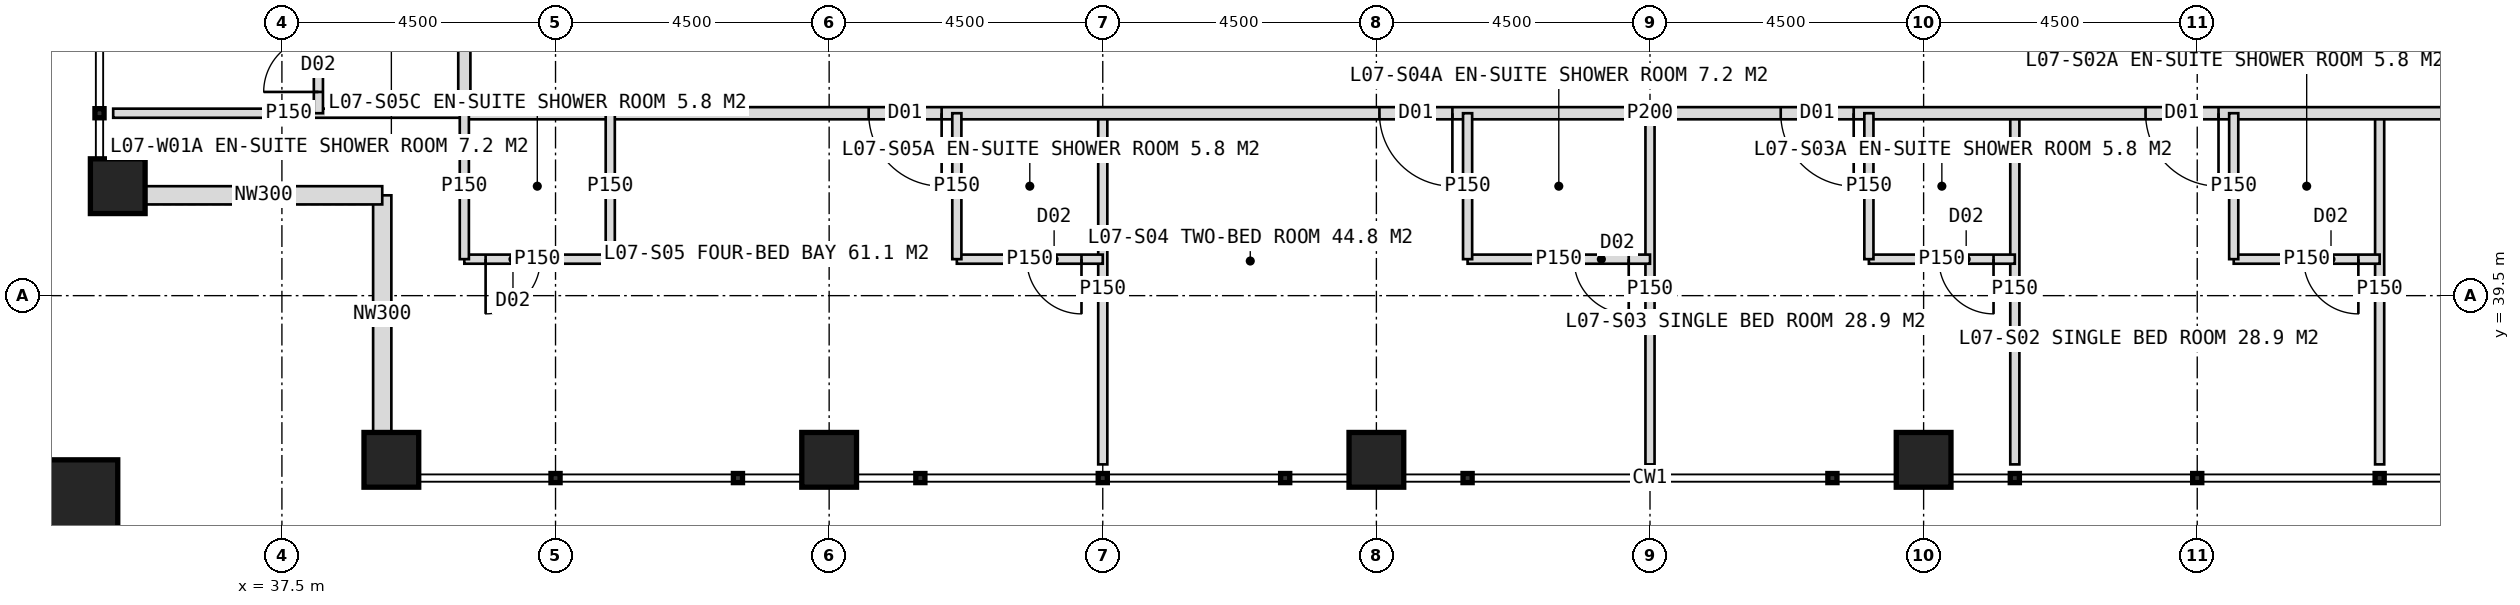
"""IFC4 building model, lengths in metres.
Left out: names, types, materials, properties, quantities, classifications, styles, units other than length and angle.
Written with IfcOpenShell. Run it as: python <this file> out.ifc"""

import sys

from ifc_helpers import new_model, si_unit, direction, frame, frame_2d, origin, origin_2d, place, context, subcontext, project, spatial, rectangle, hollow_rectangle, extrude, element, fill, save


model = new_model("IFC4")
c1 = context("Model", 3, precision=1e-05, world=origin(), true_north=direction((0.0, 1.0)))
c2 = subcontext(c1, "Body", "Model", "MODEL_VIEW")
j1 = project(units=[si_unit("LENGTHUNIT", "METRE"), si_unit("PLANEANGLEUNIT", "RADIAN")], contexts=[c1])
p1 = place(None, origin())
s1 = spatial("IfcSite", under=j1, at=p1, CompositionType="ELEMENT")
p2 = place(p1, origin())
s2 = spatial("IfcBuilding", under=s1, at=p2, CompositionType="ELEMENT")
p3 = place(p2, frame((0.0, 0.0, 35.0)))
s3 = spatial("IfcBuildingStorey", under=s2, at=p3, CompositionType="ELEMENT", Elevation=35.0)
for number, where, z_axis, x_axis in (
    (1, (39.3, 36.8, 0.0), (0.0, 0.0, 1.0), (1.0, 0.0, 0.0)),
    (2, (34.8, 41.3, 0.0), (0.0, 0.0, 1.0), (1.0, 0.0, 0.0)),
    (3, (46.5, 36.8, 0.0), (0.0, 0.0, 1.0), (1.0, 0.0, 0.0)),
    (4, (55.5, 36.8, 0.0), (0.0, 0.0, 1.0), (1.0, 0.0, 0.0)),
    (5, (64.5, 36.8, 0.0), (0.0, 0.0, 1.0), (1.0, 0.0, 0.0)),
):
    element("IfcColumn", number, at=place(p3, frame(where, z_axis=z_axis, x_axis=x_axis)), inside=s3, PredefinedType="COLUMN", context=c2, shape_type="SweptSolid", body=[
        extrude(hollow_rectangle(XDim=0.9, YDim=0.9, WallThickness=0.08, at=origin_2d()), origin(), (0.0, 0.0, 1.0), 4.0),
    ])
p4 = place(p3, frame((33.9, 35.9, 0.0), z_axis=(0.0, 0.0, 1.0), x_axis=(1.0, 0.0, 0.0)))
e6 = element("IfcColumn", 6, at=p4, inside=s3, PredefinedType="COLUMN", context=c2, shape_type="SweptSolid", body=[
    extrude(hollow_rectangle(XDim=1.8, YDim=1.8, WallThickness=0.1, at=origin_2d()), origin(), (0.0, 0.0, 1.0), 4.0),
])
for number, where, z_axis, x_axis in (
    (7, (39.15, 37.25, 0.0), (0.0, 0.0, 1.0), (0.0, 1.0, 0.0)),
    (8, (39.15, 41.15, 0.0), (0.0, 0.0, 1.0), (-1.0, 0.0, 0.0)),
):
    element("IfcWall", number, at=place(p3, frame(where, z_axis=z_axis, x_axis=x_axis)), inside=s3, PredefinedType="ELEMENTEDWALL", context=c2, shape_type="SweptSolid", body=[
        extrude(rectangle(XDim=3.9, YDim=0.3, at=frame_2d((1.95, 0.0))), origin(), (0.0, 0.0, 1.0), 2.95),
    ])
p5 = place(p3, frame((40.5, 42.5, 0.0), z_axis=(0.0, 0.0, 1.0), x_axis=(0.0, 1.0, 0.0)))
e9 = element("IfcWall", 9, at=p5, inside=s3, PredefinedType="PARTITIONING", context=c2, shape_type="SweptSolid", body=[
    extrude(rectangle(XDim=39.0, YDim=0.2, at=frame_2d((19.5, 0.0))), origin(), (0.0, 0.0, 1.0), 3.75),
])
p6 = place(p5, frame((3.25, 0.0, 0.0)))
e10 = element("IfcOpeningElement", 10, at=p6, cuts=e9, PredefinedType="OPENING", context=c2, shape_type="SweptSolid", body=[
    extrude(rectangle(XDim=1.2, YDim=2.2, at=frame_2d((0.6, 1.1))), frame((0.0, 0.11, 0.0), z_axis=(0.0, -1.0, 0.0), x_axis=(1.0, 0.0, 0.0)), (0.0, 0.0, 1.0), 0.22),
])
p7 = place(p5, frame((10.15, 0.0, 0.0)))
e11 = element("IfcOpeningElement", 11, at=p7, cuts=e9, PredefinedType="OPENING", context=c2, shape_type="SweptSolid", body=[
    extrude(rectangle(XDim=1.2, YDim=2.2, at=frame_2d((0.6, 1.1))), frame((0.0, 0.11, 0.0), z_axis=(0.0, -1.0, 0.0), x_axis=(1.0, 0.0, 0.0)), (0.0, 0.0, 1.0), 0.22),
])
p8 = place(p5, frame((16.15, 0.0, 0.0)))
e12 = element("IfcOpeningElement", 12, at=p8, cuts=e9, PredefinedType="OPENING", context=c2, shape_type="SweptSolid", body=[
    extrude(rectangle(XDim=1.2, YDim=2.2, at=frame_2d((0.6, 1.1))), frame((0.0, 0.11, 0.0), z_axis=(0.0, -1.0, 0.0), x_axis=(1.0, 0.0, 0.0)), (0.0, 0.0, 1.0), 0.22),
])
p9 = place(p5, frame((22.75, 0.0, 0.0)))
e13 = element("IfcOpeningElement", 13, at=p9, cuts=e9, PredefinedType="OPENING", context=c2, shape_type="SweptSolid", body=[
    extrude(rectangle(XDim=1.2, YDim=2.2, at=frame_2d((0.6, 1.1))), frame((0.0, 0.11, 0.0), z_axis=(0.0, -1.0, 0.0), x_axis=(1.0, 0.0, 0.0)), (0.0, 0.0, 1.0), 0.22),
])
p10 = place(p5, frame((31.15, 0.0, 0.0)))
e14 = element("IfcOpeningElement", 14, at=p10, cuts=e9, PredefinedType="OPENING", context=c2, shape_type="SweptSolid", body=[
    extrude(rectangle(XDim=1.2, YDim=2.2, at=frame_2d((0.6, 1.1))), frame((0.0, 0.11, 0.0), z_axis=(0.0, -1.0, 0.0), x_axis=(1.0, 0.0, 0.0)), (0.0, 0.0, 1.0), 0.22),
])
p11 = place(p3, frame((40.5, 42.5, 0.0), z_axis=(0.0, 0.0, 1.0), x_axis=(-1.0, 0.0, 0.0)))
e15 = element("IfcWall", 15, at=p11, inside=s3, PredefinedType="PARTITIONING", context=c2, shape_type="SweptSolid", body=[
    extrude(rectangle(XDim=5.775, YDim=0.15, at=frame_2d((2.887, 0.0))), origin(), (0.0, 0.0, 1.0), 3.75),
])
p12 = place(p3, frame((38.1, 42.5, 0.0), z_axis=(0.0, 0.0, 1.0), x_axis=(0.0, 1.0, 0.0)))
e16 = element("IfcWall", 16, at=p12, inside=s3, PredefinedType="PARTITIONING", context=c2, shape_type="SweptSolid", body=[
    extrude(rectangle(XDim=3.0, YDim=0.15, at=frame_2d((1.5, 0.0))), origin(), (0.0, 0.0, 1.0), 3.75),
])
p13 = place(p12, frame((0.35, 0.0, 0.0)))
e17 = element("IfcOpeningElement", 17, at=p13, cuts=e16, PredefinedType="OPENING", context=c2, shape_type="SweptSolid", body=[
    extrude(rectangle(XDim=0.9, YDim=2.1, at=frame_2d((0.45, 1.05))), frame((0.0, 0.085, 0.0), z_axis=(0.0, -1.0, 0.0), x_axis=(1.0, 0.0, 0.0)), (0.0, 0.0, 1.0), 0.17),
])
for number, where, z_axis, x_axis in (
    (18, (72.0, 42.5, 0.0), (0.0, 0.0, 1.0), (0.0, -1.0, 0.0)),
    (19, (66.0, 42.5, 0.0), (0.0, 0.0, 1.0), (0.0, -1.0, 0.0)),
):
    element("IfcWall", number, at=place(p3, frame(where, z_axis=z_axis, x_axis=x_axis)), inside=s3, PredefinedType="PARTITIONING", context=c2, shape_type="SweptSolid", body=[
        extrude(rectangle(XDim=5.775, YDim=0.15, at=frame_2d((2.887, 0.0))), origin(), (0.0, 0.0, 1.0), 3.75),
    ])
p14 = place(p3, frame((60.0, 42.5, 0.0), z_axis=(0.0, 0.0, 1.0), x_axis=(0.0, -1.0, 0.0)))
e20 = element("IfcWall", 20, at=p14, inside=s3, PredefinedType="PARTITIONING", context=c2, shape_type="SweptSolid", body=[
    extrude(rectangle(XDim=5.775, YDim=0.15, at=frame_2d((2.887, 0.0))), origin(), (0.0, 0.0, 1.0), 2.75),
])
p15 = place(p3, frame((51.0, 42.5, 0.0), z_axis=(0.0, 0.0, 1.0), x_axis=(0.0, -1.0, 0.0)))
e21 = element("IfcWall", 21, at=p15, inside=s3, PredefinedType="PARTITIONING", context=c2, shape_type="SweptSolid", body=[
    extrude(rectangle(XDim=5.775, YDim=0.15, at=frame_2d((2.887, 0.0))), origin(), (0.0, 0.0, 1.0), 3.75),
])
p16 = place(p3, frame((79.5, 42.5, 0.0), z_axis=(0.0, 0.0, 1.0), x_axis=(-1.0, 0.0, 0.0)))
e22 = element("IfcWall", 22, at=p16, inside=s3, PredefinedType="PARTITIONING", context=c2, shape_type="SweptSolid", body=[
    extrude(rectangle(XDim=39.0, YDim=0.2, at=frame_2d((19.5, 0.0))), origin(), (0.0, 0.0, 1.0), 3.75),
])
p17 = place(p16, frame((3.25, 0.0, 0.0)))
e23 = element("IfcOpeningElement", 23, at=p17, cuts=e22, PredefinedType="OPENING", context=c2, shape_type="SweptSolid", body=[
    extrude(rectangle(XDim=1.2, YDim=2.2, at=frame_2d((0.6, 1.1))), frame((0.0, 0.11, 0.0), z_axis=(0.0, -1.0, 0.0), x_axis=(1.0, 0.0, 0.0)), (0.0, 0.0, 1.0), 0.22),
])
p18 = place(p16, frame((10.15, 0.0, 0.0)))
e24 = element("IfcOpeningElement", 24, at=p18, cuts=e22, PredefinedType="OPENING", context=c2, shape_type="SweptSolid", body=[
    extrude(rectangle(XDim=1.2, YDim=2.2, at=frame_2d((0.6, 1.1))), frame((0.0, 0.11, 0.0), z_axis=(0.0, -1.0, 0.0), x_axis=(1.0, 0.0, 0.0)), (0.0, 0.0, 1.0), 0.22),
])
p19 = place(p16, frame((16.15, 0.0, 0.0)))
e25 = element("IfcOpeningElement", 25, at=p19, cuts=e22, PredefinedType="OPENING", context=c2, shape_type="SweptSolid", body=[
    extrude(rectangle(XDim=1.2, YDim=2.2, at=frame_2d((0.6, 1.1))), frame((0.0, 0.11, 0.0), z_axis=(0.0, -1.0, 0.0), x_axis=(1.0, 0.0, 0.0)), (0.0, 0.0, 1.0), 0.22),
])
p20 = place(p16, frame((22.75, 0.0, 0.0)))
e26 = element("IfcOpeningElement", 26, at=p20, cuts=e22, PredefinedType="OPENING", context=c2, shape_type="SweptSolid", body=[
    extrude(rectangle(XDim=1.2, YDim=2.2, at=frame_2d((0.6, 1.1))), frame((0.0, 0.11, 0.0), z_axis=(0.0, -1.0, 0.0), x_axis=(1.0, 0.0, 0.0)), (0.0, 0.0, 1.0), 0.22),
])
p21 = place(p16, frame((31.15, 0.0, 0.0)))
e27 = element("IfcOpeningElement", 27, at=p21, cuts=e22, PredefinedType="OPENING", context=c2, shape_type="SweptSolid", body=[
    extrude(rectangle(XDim=1.2, YDim=2.2, at=frame_2d((0.6, 1.1))), frame((0.0, 0.11, 0.0), z_axis=(0.0, -1.0, 0.0), x_axis=(1.0, 0.0, 0.0)), (0.0, 0.0, 1.0), 0.22),
])
p22 = place(p3, frame((72.0, 40.1, 0.0), z_axis=(0.0, 0.0, 1.0), x_axis=(-1.0, 0.0, 0.0)))
e28 = element("IfcWall", 28, at=p22, inside=s3, PredefinedType="PARTITIONING", context=c2, shape_type="SweptSolid", body=[
    extrude(rectangle(XDim=2.4, YDim=0.15, at=frame_2d((1.2, 0.0))), origin(), (0.0, 0.0, 1.0), 3.75),
])
p23 = place(p22, frame((0.35, 0.0, 0.0)))
e29 = element("IfcOpeningElement", 29, at=p23, cuts=e28, PredefinedType="OPENING", context=c2, shape_type="SweptSolid", body=[
    extrude(rectangle(XDim=0.9, YDim=2.1, at=frame_2d((0.45, 1.05))), frame((0.0, 0.085, 0.0), z_axis=(0.0, -1.0, 0.0), x_axis=(1.0, 0.0, 0.0)), (0.0, 0.0, 1.0), 0.17),
])
p24 = place(p3, frame((69.6, 42.5, 0.0), z_axis=(0.0, 0.0, 1.0), x_axis=(0.0, -1.0, 0.0)))
e30 = element("IfcWall", 30, at=p24, inside=s3, PredefinedType="PARTITIONING", context=c2, shape_type="SweptSolid", body=[
    extrude(rectangle(XDim=2.4, YDim=0.15, at=frame_2d((1.2, 0.0))), origin(), (0.0, 0.0, 1.0), 3.75),
])
p25 = place(p3, frame((66.0, 40.1, 0.0), z_axis=(0.0, 0.0, 1.0), x_axis=(-1.0, 0.0, 0.0)))
e31 = element("IfcWall", 31, at=p25, inside=s3, PredefinedType="PARTITIONING", context=c2, shape_type="SweptSolid", body=[
    extrude(rectangle(XDim=2.4, YDim=0.15, at=frame_2d((1.2, 0.0))), origin(), (0.0, 0.0, 1.0), 3.75),
])
p26 = place(p25, frame((0.35, 0.0, 0.0)))
e32 = element("IfcOpeningElement", 32, at=p26, cuts=e31, PredefinedType="OPENING", context=c2, shape_type="SweptSolid", body=[
    extrude(rectangle(XDim=0.9, YDim=2.1, at=frame_2d((0.45, 1.05))), frame((0.0, 0.085, 0.0), z_axis=(0.0, -1.0, 0.0), x_axis=(1.0, 0.0, 0.0)), (0.0, 0.0, 1.0), 0.17),
])
p27 = place(p3, frame((63.6, 42.5, 0.0), z_axis=(0.0, 0.0, 1.0), x_axis=(0.0, -1.0, 0.0)))
e33 = element("IfcWall", 33, at=p27, inside=s3, PredefinedType="PARTITIONING", context=c2, shape_type="SweptSolid", body=[
    extrude(rectangle(XDim=2.4, YDim=0.15, at=frame_2d((1.2, 0.0))), origin(), (0.0, 0.0, 1.0), 3.75),
])
p28 = place(p3, frame((60.0, 40.1, 0.0), z_axis=(0.0, 0.0, 1.0), x_axis=(-1.0, 0.0, 0.0)))
e34 = element("IfcWall", 34, at=p28, inside=s3, PredefinedType="PARTITIONING", context=c2, shape_type="SweptSolid", body=[
    extrude(rectangle(XDim=3.0, YDim=0.15, at=frame_2d((1.5, 0.0))), origin(), (0.0, 0.0, 1.0), 3.75),
])
p29 = place(p28, frame((0.35, 0.0, 0.0)))
e35 = element("IfcOpeningElement", 35, at=p29, cuts=e34, PredefinedType="OPENING", context=c2, shape_type="SweptSolid", body=[
    extrude(rectangle(XDim=0.9, YDim=2.1, at=frame_2d((0.45, 1.05))), frame((0.0, 0.085, 0.0), z_axis=(0.0, -1.0, 0.0), x_axis=(1.0, 0.0, 0.0)), (0.0, 0.0, 1.0), 0.17),
])
p30 = place(p3, frame((57.0, 42.5, 0.0), z_axis=(0.0, 0.0, 1.0), x_axis=(0.0, -1.0, 0.0)))
e36 = element("IfcWall", 36, at=p30, inside=s3, PredefinedType="PARTITIONING", context=c2, shape_type="SweptSolid", body=[
    extrude(rectangle(XDim=2.4, YDim=0.15, at=frame_2d((1.2, 0.0))), origin(), (0.0, 0.0, 1.0), 3.75),
])
p31 = place(p3, frame((51.0, 40.1, 0.0), z_axis=(0.0, 0.0, 1.0), x_axis=(-1.0, 0.0, 0.0)))
e37 = element("IfcWall", 37, at=p31, inside=s3, PredefinedType="PARTITIONING", context=c2, shape_type="SweptSolid", body=[
    extrude(rectangle(XDim=2.4, YDim=0.15, at=frame_2d((1.2, 0.0))), origin(), (0.0, 0.0, 1.0), 3.75),
])
p32 = place(p31, frame((0.35, 0.0, 0.0)))
e38 = element("IfcOpeningElement", 38, at=p32, cuts=e37, PredefinedType="OPENING", context=c2, shape_type="SweptSolid", body=[
    extrude(rectangle(XDim=0.9, YDim=2.1, at=frame_2d((0.45, 1.05))), frame((0.0, 0.085, 0.0), z_axis=(0.0, -1.0, 0.0), x_axis=(1.0, 0.0, 0.0)), (0.0, 0.0, 1.0), 0.17),
])
p33 = place(p3, frame((48.6, 42.5, 0.0), z_axis=(0.0, 0.0, 1.0), x_axis=(0.0, -1.0, 0.0)))
e39 = element("IfcWall", 39, at=p33, inside=s3, PredefinedType="PARTITIONING", context=c2, shape_type="SweptSolid", body=[
    extrude(rectangle(XDim=2.4, YDim=0.15, at=frame_2d((1.2, 0.0))), origin(), (0.0, 0.0, 1.0), 3.75),
])
p34 = place(p3, frame((42.9, 40.1, 0.0), z_axis=(0.0, 0.0, 1.0), x_axis=(-1.0, 0.0, 0.0)))
e40 = element("IfcWall", 40, at=p34, inside=s3, PredefinedType="PARTITIONING", context=c2, shape_type="SweptSolid", body=[
    extrude(rectangle(XDim=2.4, YDim=0.15, at=frame_2d((1.2, 0.0))), origin(), (0.0, 0.0, 1.0), 3.75),
])
p35 = place(p34, frame((1.15, 0.0, 0.0)))
e41 = element("IfcOpeningElement", 41, at=p35, cuts=e40, PredefinedType="OPENING", context=c2, shape_type="SweptSolid", body=[
    extrude(rectangle(XDim=0.9, YDim=2.1, at=frame_2d((0.45, 1.05))), frame((0.0, 0.085, 0.0), z_axis=(0.0, -1.0, 0.0), x_axis=(1.0, 0.0, 0.0)), (0.0, 0.0, 1.0), 0.17),
])
for number, where, z_axis, x_axis in (
    (42, (42.9, 42.5, 0.0), (0.0, 0.0, 1.0), (0.0, -1.0, 0.0)),
    (43, (40.5, 42.5, 0.0), (0.0, 0.0, 1.0), (0.0, -1.0, 0.0)),
):
    element("IfcWall", number, at=place(p3, frame(where, z_axis=z_axis, x_axis=x_axis)), inside=s3, PredefinedType="PARTITIONING", context=c2, shape_type="SweptSolid", body=[
        extrude(rectangle(XDim=2.4, YDim=0.15, at=frame_2d((1.2, 0.0))), origin(), (0.0, 0.0, 1.0), 3.75),
    ])
p36 = place(p13, origin())
e44 = element("IfcDoor", 44, at=p36, inside=s3, OperationType="SINGLE_SWING_LEFT", PredefinedType="DOOR", context=c2, shape_type="SweptSolid", body=[
    extrude(rectangle(XDim=0.9, YDim=2.1, at=frame_2d((0.45, 1.05))), frame((0.0, 0.025, 0.0), z_axis=(0.0, -1.0, 0.0), x_axis=(1.0, 0.0, 0.0)), (0.0, 0.0, 1.0), 0.05),
])
fill(e17, e44)
p37 = place(p18, origin())
e45 = element("IfcDoor", 45, at=p37, inside=s3, OperationType="SINGLE_SWING_LEFT", PredefinedType="DOOR", context=c2, shape_type="SweptSolid", body=[
    extrude(rectangle(XDim=1.2, YDim=2.2, at=frame_2d((0.6, 1.1))), frame((0.0, 0.025, 0.0), z_axis=(0.0, -1.0, 0.0), x_axis=(1.0, 0.0, 0.0)), (0.0, 0.0, 1.0), 0.05),
])
fill(e24, e45)
p38 = place(p23, origin())
e46 = element("IfcDoor", 46, at=p38, inside=s3, OperationType="SINGLE_SWING_LEFT", PredefinedType="DOOR", context=c2, shape_type="SweptSolid", body=[
    extrude(rectangle(XDim=0.9, YDim=2.1, at=frame_2d((0.45, 1.05))), frame((0.0, 0.025, 0.0), z_axis=(0.0, -1.0, 0.0), x_axis=(1.0, 0.0, 0.0)), (0.0, 0.0, 1.0), 0.05),
])
fill(e29, e46)
p39 = place(p19, origin())
e47 = element("IfcDoor", 47, at=p39, inside=s3, OperationType="SINGLE_SWING_LEFT", PredefinedType="DOOR", context=c2, shape_type="SweptSolid", body=[
    extrude(rectangle(XDim=1.2, YDim=2.2, at=frame_2d((0.6, 1.1))), frame((0.0, 0.025, 0.0), z_axis=(0.0, -1.0, 0.0), x_axis=(1.0, 0.0, 0.0)), (0.0, 0.0, 1.0), 0.05),
])
fill(e25, e47)
p40 = place(p26, origin())
e48 = element("IfcDoor", 48, at=p40, inside=s3, OperationType="SINGLE_SWING_LEFT", PredefinedType="DOOR", context=c2, shape_type="SweptSolid", body=[
    extrude(rectangle(XDim=0.9, YDim=2.1, at=frame_2d((0.45, 1.05))), frame((0.0, 0.025, 0.0), z_axis=(0.0, -1.0, 0.0), x_axis=(1.0, 0.0, 0.0)), (0.0, 0.0, 1.0), 0.05),
])
fill(e32, e48)
p41 = place(p20, origin())
e49 = element("IfcDoor", 49, at=p41, inside=s3, OperationType="SINGLE_SWING_LEFT", PredefinedType="DOOR", context=c2, shape_type="SweptSolid", body=[
    extrude(rectangle(XDim=1.2, YDim=2.2, at=frame_2d((0.6, 1.1))), frame((0.0, 0.025, 0.0), z_axis=(0.0, -1.0, 0.0), x_axis=(1.0, 0.0, 0.0)), (0.0, 0.0, 1.0), 0.05),
])
fill(e26, e49)
p42 = place(p29, origin())
e50 = element("IfcDoor", 50, at=p42, inside=s3, OperationType="SINGLE_SWING_LEFT", PredefinedType="DOOR", context=c2, shape_type="SweptSolid", body=[
    extrude(rectangle(XDim=0.9, YDim=2.1, at=frame_2d((0.45, 1.05))), frame((0.0, 0.025, 0.0), z_axis=(0.0, -1.0, 0.0), x_axis=(1.0, 0.0, 0.0)), (0.0, 0.0, 1.0), 0.05),
])
fill(e35, e50)
p43 = place(p21, origin())
e51 = element("IfcDoor", 51, at=p43, inside=s3, OperationType="SINGLE_SWING_LEFT", PredefinedType="DOOR", context=c2, shape_type="SweptSolid", body=[
    extrude(rectangle(XDim=1.2, YDim=2.2, at=frame_2d((0.6, 1.1))), frame((0.0, 0.025, 0.0), z_axis=(0.0, -1.0, 0.0), x_axis=(1.0, 0.0, 0.0)), (0.0, 0.0, 1.0), 0.05),
])
fill(e27, e51)
p44 = place(p32, origin())
e52 = element("IfcDoor", 52, at=p44, inside=s3, OperationType="SINGLE_SWING_LEFT", PredefinedType="DOOR", context=c2, shape_type="SweptSolid", body=[
    extrude(rectangle(XDim=0.9, YDim=2.1, at=frame_2d((0.45, 1.05))), frame((0.0, 0.025, 0.0), z_axis=(0.0, -1.0, 0.0), x_axis=(1.0, 0.0, 0.0)), (0.0, 0.0, 1.0), 0.05),
])
fill(e38, e52)
p45 = place(p35, origin())
e53 = element("IfcDoor", 53, at=p45, inside=s3, OperationType="SINGLE_SWING_RIGHT", PredefinedType="DOOR", context=c2, shape_type="SweptSolid", body=[
    extrude(rectangle(XDim=0.9, YDim=2.1, at=frame_2d((0.45, 1.05))), frame((0.0, 0.025, 0.0), z_axis=(0.0, -1.0, 0.0), x_axis=(1.0, 0.0, 0.0)), (0.0, 0.0, 1.0), 0.05),
])
fill(e41, e53)
save(model, sys.argv[1])
